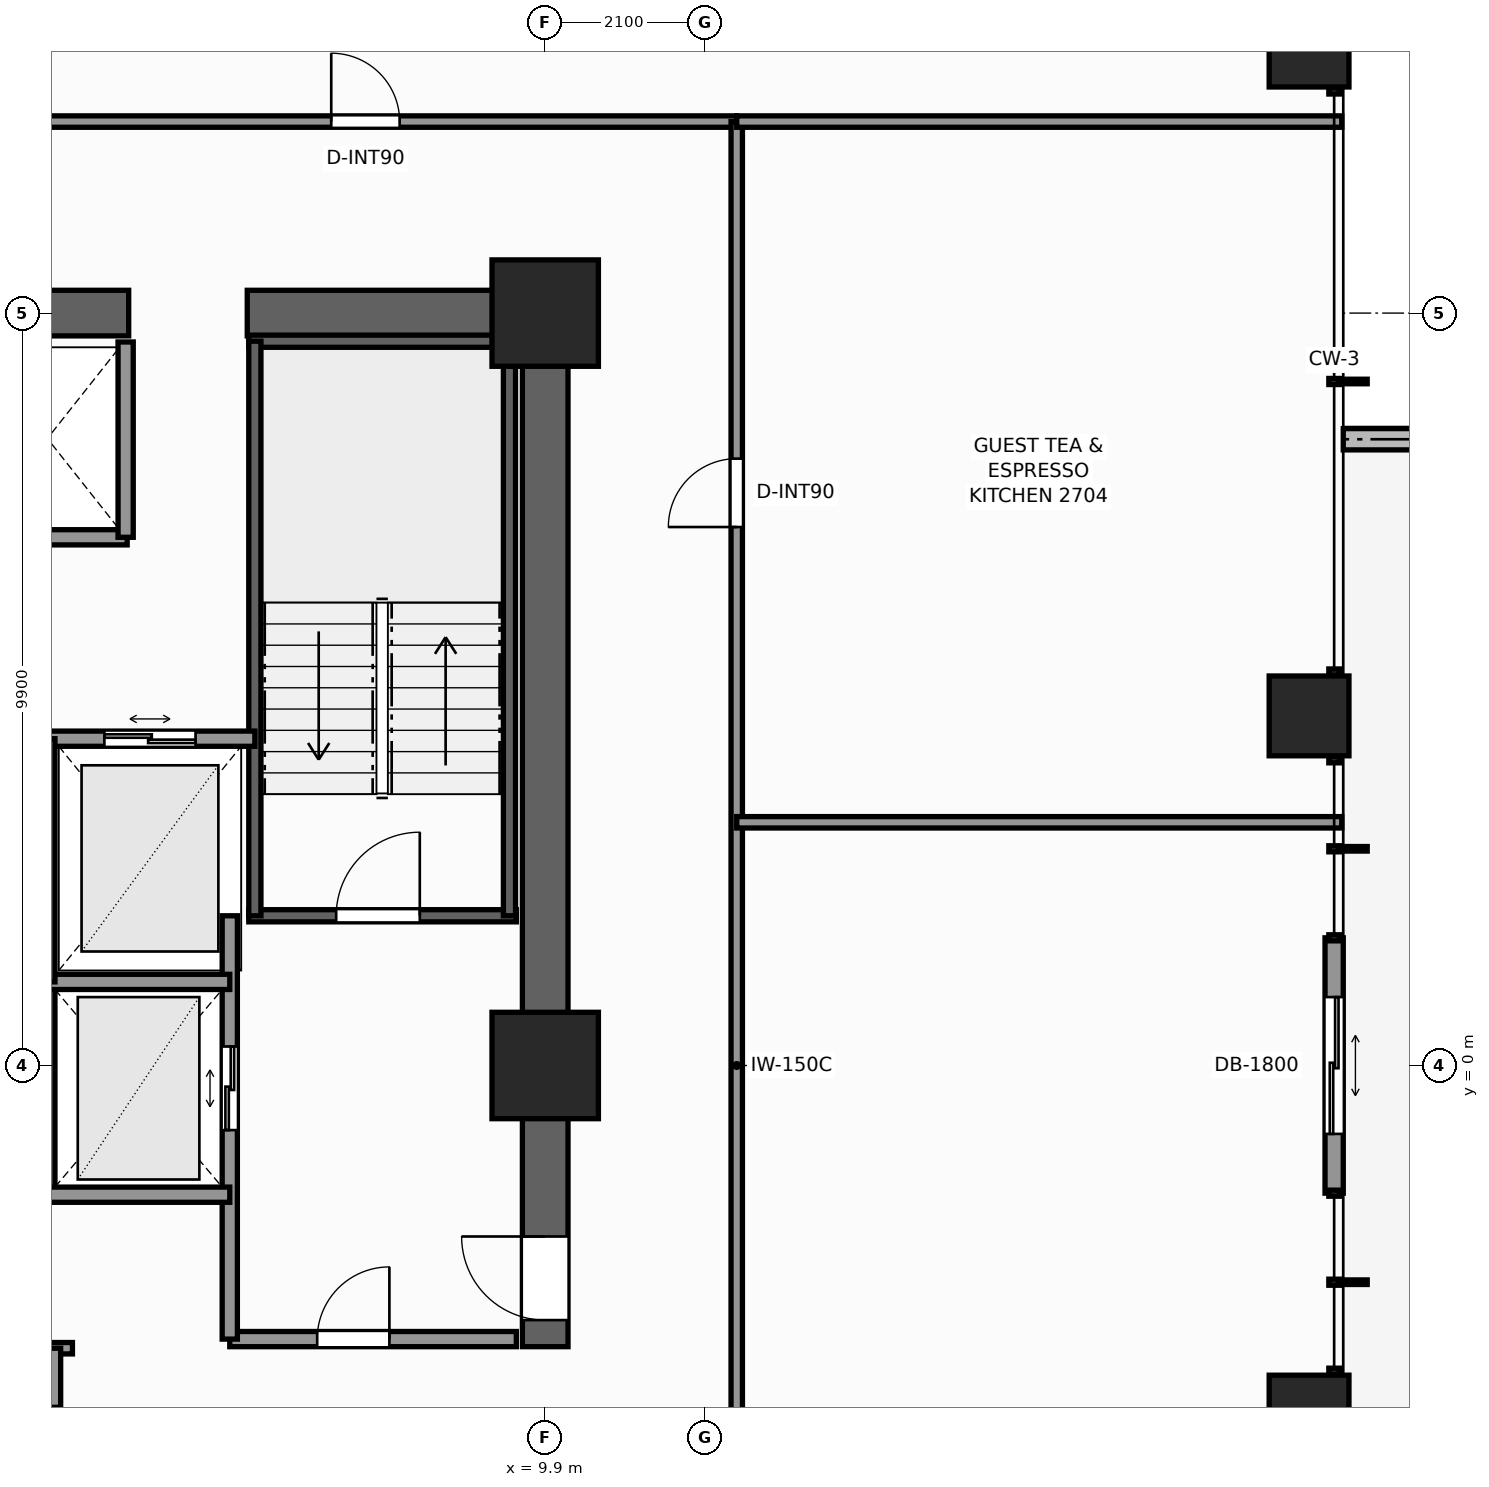
"""IFC4 building model, lengths in metres.
Left out: names, types, materials, properties, quantities, classifications, styles, units other than length and angle.
Written with IfcOpenShell. Run it as: python <this file> out.ifc"""

import sys

from ifc_helpers import new_model, si_unit, direction, frame, frame_2d, origin, origin_2d, place, context, subcontext, project, spatial, rectangle, extrude, element, fill, save


model = new_model("IFC4")
c1 = context("Model", 3, precision=1e-05, world=origin(), true_north=direction((0.0, 1.0)))
c2 = subcontext(c1, "Body", "Model", "MODEL_VIEW")
j1 = project(units=[si_unit("LENGTHUNIT", "METRE"), si_unit("PLANEANGLEUNIT", "RADIAN")], contexts=[c1])
p1 = place(None, origin())
s1 = spatial("IfcSite", under=j1, at=p1, CompositionType="ELEMENT")
p2 = place(p1, origin())
s2 = spatial("IfcBuilding", under=s1, at=p2, CompositionType="ELEMENT")
p3 = place(p2, frame((0.0, 0.0, 95.3)))
s3 = spatial("IfcBuildingStorey", under=s2, at=p3, CompositionType="ELEMENT", Elevation=95.3)
p4 = place(p3, frame((-10.2, 9.9, 0.0), z_axis=(0.0, 0.0, 1.0), x_axis=(1.0, 0.0, 0.0)))
e1 = element("IfcWall", 1, at=p4, inside=s3, PredefinedType="SHEAR", context=c2, shape_type="SweptSolid", body=[
    extrude(rectangle(XDim=14.62, YDim=0.6, at=frame_2d((7.31, 0.0))), origin(), (0.0, 0.0, 1.0), 3.3),
])
p5 = place(p3, frame((5.98, 9.9, 0.0), z_axis=(0.0, 0.0, 1.0), x_axis=(1.0, 0.0, 0.0)))
e2 = element("IfcWall", 2, at=p5, inside=s3, PredefinedType="SHEAR", context=c2, shape_type="SweptSolid", body=[
    extrude(rectangle(XDim=4.22, YDim=0.6, at=frame_2d((2.11, 0.0))), origin(), (0.0, 0.0, 1.0), 3.3),
])
p6 = place(p3, frame((9.9, -3.7, 0.0), z_axis=(0.0, 0.0, 1.0), x_axis=(0.0, 1.0, 0.0)))
e3 = element("IfcWall", 3, at=p6, inside=s3, PredefinedType="SHEAR", context=c2, shape_type="SweptSolid", body=[
    extrude(rectangle(XDim=13.3, YDim=0.6, at=frame_2d((6.65, 0.0))), origin(), (0.0, 0.0, 1.0), 3.3),
])
p7 = place(p6, frame((0.35, 0.0, 0.0)))
e4 = element("IfcOpeningElement", 4, at=p7, cuts=e3, PredefinedType="OPENING", context=c2, shape_type="SweptSolid", body=[
    extrude(rectangle(XDim=1.1, YDim=2.2, at=frame_2d((0.55, 1.1))), frame((0.0, 0.31, 0.0), z_axis=(0.0, -1.0, 0.0), x_axis=(1.0, 0.0, 0.0)), (0.0, 0.0, 1.0), 0.62),
])
for number, where, z_axis, x_axis in (
    (5, (9.9, 9.9, 0.0), (0.0, 0.0, 1.0), (1.0, 0.0, 0.0)),
    (6, (9.9, 0.0, 0.0), (0.0, 0.0, 1.0), (1.0, 0.0, 0.0)),
):
    element("IfcColumn", number, at=place(p3, frame(where, z_axis=z_axis, x_axis=x_axis)), inside=s3, PredefinedType="COLUMN", context=c2, shape_type="SweptSolid", body=[
        extrude(rectangle(XDim=1.4, YDim=1.4, at=origin_2d()), origin(), (0.0, 0.0, 1.0), 3.3),
    ])
for number, where, z_axis, x_axis in (
    (7, (19.95, -4.6, 0.0), (0.0, 0.0, 1.0), (1.0, 0.0, 0.0)),
    (8, (19.95, 4.6, 0.0), (0.0, 0.0, 1.0), (1.0, 0.0, 0.0)),
    (9, (19.95, 13.4, 0.0), (0.0, 0.0, 1.0), (1.0, 0.0, 0.0)),
):
    element("IfcColumn", number, at=place(p3, frame(where, z_axis=z_axis, x_axis=x_axis)), inside=s3, PredefinedType="COLUMN", context=c2, shape_type="SweptSolid", body=[
        extrude(rectangle(XDim=1.05, YDim=1.05, at=origin_2d()), origin(), (0.0, 0.0, 1.0), 3.3),
    ])
p8 = place(p3, frame((23.767, 8.24, -0.04), z_axis=(0.0, 0.0, 1.0), x_axis=(-1.0, 0.0, 0.0)))
e10 = element("IfcWall", 10, at=p8, inside=s3, PredefinedType="PARAPET", context=c2, shape_type="SweptSolid", body=[
    extrude(rectangle(XDim=3.367, YDim=0.28, at=frame_2d((1.684, 0.0))), origin(), (0.0, 0.0, 1.0), 0.42),
])
p9 = place(p3, frame((20.28, 1.68, 0.0), z_axis=(0.0, 0.0, 1.0), x_axis=(0.0, -1.0, 0.0)))
e11 = element("IfcWall", 11, at=p9, inside=s3, PredefinedType="STANDARD", context=c2, shape_type="SweptSolid", body=[
    extrude(rectangle(XDim=3.36, YDim=0.24, at=frame_2d((1.68, 0.0))), origin(), (0.0, 0.0, 1.0), 3.08),
])
p10 = place(p9, frame((0.78, 0.0, 0.0)))
e12 = element("IfcOpeningElement", 12, at=p10, cuts=e11, PredefinedType="OPENING", context=c2, shape_type="SweptSolid", body=[
    extrude(rectangle(XDim=1.8, YDim=2.2, at=frame_2d((0.9, 1.1))), frame((0.0, 0.13, 0.0), z_axis=(0.0, -1.0, 0.0), x_axis=(1.0, 0.0, 0.0)), (0.0, 0.0, 1.0), 0.26),
])
p11 = place(p3, frame((6.0, 1.97, 0.0), z_axis=(0.0, 0.0, 1.0), x_axis=(1.0, 0.0, 0.0)))
e13 = element("IfcWall", 13, at=p11, inside=s3, PredefinedType="SHEAR", context=c2, shape_type="SweptSolid", body=[
    extrude(rectangle(XDim=3.52, YDim=0.16, at=frame_2d((1.76, 0.0))), origin(), (0.0, 0.0, 1.0), 3.3),
])
p12 = place(p11, frame((1.15, 0.0, 0.0)))
e14 = element("IfcOpeningElement", 14, at=p12, cuts=e13, PredefinedType="OPENING", context=c2, shape_type="SweptSolid", body=[
    extrude(rectangle(XDim=1.1, YDim=2.2, at=frame_2d((0.55, 1.1))), frame((0.0, 0.09, 0.0), z_axis=(0.0, -1.0, 0.0), x_axis=(1.0, 0.0, 0.0)), (0.0, 0.0, 1.0), 0.18),
])
p13 = place(p3, frame((6.0, 9.53, 0.0), z_axis=(0.0, 0.0, 1.0), x_axis=(1.0, 0.0, 0.0)))
e15 = element("IfcWall", 15, at=p13, inside=s3, PredefinedType="SHEAR", context=c2, shape_type="SweptSolid", body=[
    extrude(rectangle(XDim=3.52, YDim=0.16, at=frame_2d((1.76, 0.0))), origin(), (0.0, 0.0, 1.0), 3.3),
])
for number, where, z_axis, x_axis in (
    (16, (6.08, 1.97, 0.0), (0.0, 0.0, 1.0), (0.0, 1.0, 0.0)),
    (17, (9.43, 1.97, 0.0), (0.0, 0.0, 1.0), (0.0, 1.0, 0.0)),
):
    element("IfcWall", number, at=place(p3, frame(where, z_axis=z_axis, x_axis=x_axis)), inside=s3, PredefinedType="SHEAR", context=c2, shape_type="SweptSolid", body=[
        extrude(rectangle(XDim=7.56, YDim=0.16, at=frame_2d((3.78, 0.0))), origin(), (0.0, 0.0, 1.0), 3.3),
    ])
p14 = place(p3, frame((5.75, -3.6, 0.0), z_axis=(0.0, 0.0, 1.0), x_axis=(1.0, 0.0, 0.0)))
e18 = element("IfcWall", 18, at=p14, inside=s3, PredefinedType="SOLIDWALL", context=c2, shape_type="SweptSolid", body=[
    extrude(rectangle(XDim=3.77, YDim=0.2, at=frame_2d((1.885, 0.0))), origin(), (0.0, 0.0, 1.0), 3.08),
])
p15 = place(p14, frame((1.15, 0.0, 0.0)))
e19 = element("IfcOpeningElement", 19, at=p15, cuts=e18, PredefinedType="OPENING", context=c2, shape_type="SweptSolid", body=[
    extrude(rectangle(XDim=0.95, YDim=2.06, at=frame_2d((0.475, 1.03))), frame((0.0, 0.11, 0.0), z_axis=(0.0, -1.0, 0.0), x_axis=(1.0, 0.0, 0.0)), (0.0, 0.0, 1.0), 0.22),
])
p16 = place(p3, frame((5.75, -3.6, 0.0), z_axis=(0.0, 0.0, 1.0), x_axis=(0.0, 1.0, 0.0)))
e20 = element("IfcWall", 20, at=p16, inside=s3, PredefinedType="SOLIDWALL", context=c2, shape_type="SweptSolid", body=[
    extrude(rectangle(XDim=5.57, YDim=0.2, at=frame_2d((2.785, 0.0))), origin(), (0.0, 0.0, 1.0), 3.08),
])
p17 = place(p16, frame((2.75, 0.0, 0.0)))
e21 = element("IfcOpeningElement", 21, at=p17, cuts=e20, PredefinedType="OPENING", context=c2, shape_type="SweptSolid", body=[
    extrude(rectangle(XDim=1.1, YDim=2.2, at=frame_2d((0.55, 1.1))), frame((0.0, 0.11, 0.0), z_axis=(0.0, -1.0, 0.0), x_axis=(1.0, 0.0, 0.0)), (0.0, 0.0, 1.0), 0.22),
])
p18 = place(p3, frame((3.35, -1.7, 0.0), z_axis=(0.0, 0.0, 1.0), x_axis=(0.0, 1.0, 0.0)))
e22 = element("IfcWall", 22, at=p18, inside=s3, PredefinedType="SOLIDWALL", context=c2, shape_type="SweptSolid", body=[
    extrude(rectangle(XDim=2.8, YDim=0.2, at=frame_2d((1.4, 0.0))), origin(), (0.0, 0.0, 1.0), 3.08),
])
for number, where, z_axis, x_axis in (
    (23, (3.35, -1.7, 0.0), (0.0, 0.0, 1.0), (1.0, 0.0, 0.0)),
    (24, (3.35, 1.1, 0.0), (0.0, 0.0, 1.0), (1.0, 0.0, 0.0)),
):
    element("IfcWall", number, at=place(p3, frame(where, z_axis=z_axis, x_axis=x_axis)), inside=s3, PredefinedType="SOLIDWALL", context=c2, shape_type="SweptSolid", body=[
        extrude(rectangle(XDim=2.4, YDim=0.2, at=frame_2d((1.2, 0.0))), origin(), (0.0, 0.0, 1.0), 3.08),
    ])
p19 = place(p3, frame((3.35, 4.3, 0.0), z_axis=(0.0, 0.0, 1.0), x_axis=(1.0, 0.0, 0.0)))
e25 = element("IfcWall", 25, at=p19, inside=s3, PredefinedType="SOLIDWALL", context=c2, shape_type="SweptSolid", body=[
    extrude(rectangle(XDim=2.73, YDim=0.2, at=frame_2d((1.365, 0.0))), origin(), (0.0, 0.0, 1.0), 3.08),
])
p20 = place(p19, frame((0.75, 0.0, 0.0)))
e26 = element("IfcOpeningElement", 26, at=p20, cuts=e25, PredefinedType="OPENING", context=c2, shape_type="SweptSolid", body=[
    extrude(rectangle(XDim=1.2, YDim=2.25, at=frame_2d((0.6, 1.125))), frame((0.0, 0.11, 0.0), z_axis=(0.0, -1.0, 0.0), x_axis=(1.0, 0.0, 0.0)), (0.0, 0.0, 1.0), 0.22),
])
p21 = place(p3, frame((0.22, 6.95, 0.0), z_axis=(0.0, 0.0, 1.0), x_axis=(1.0, 0.0, 0.0)))
e27 = element("IfcWall", 27, at=p21, inside=s3, PredefinedType="SOLIDWALL", context=c2, shape_type="SweptSolid", body=[
    extrude(rectangle(XDim=4.18, YDim=0.2, at=frame_2d((2.09, 0.0))), origin(), (0.0, 0.0, 1.0), 3.08),
])
p22 = place(p3, frame((4.38, 6.95, 0.0), z_axis=(0.0, 0.0, 1.0), x_axis=(0.0, 1.0, 0.0)))
e28 = element("IfcWall", 28, at=p22, inside=s3, PredefinedType="SOLIDWALL", context=c2, shape_type="SweptSolid", body=[
    extrude(rectangle(XDim=2.57, YDim=0.2, at=frame_2d((1.285, 0.0))), origin(), (0.0, 0.0, 1.0), 3.08),
])
p23 = place(p3, frame((3.35, 1.1, 0.0), z_axis=(0.0, 0.0, 1.0), x_axis=(0.0, 1.0, 0.0)))
e29 = element("IfcWall", 29, at=p23, inside=s3, PredefinedType="SOLIDWALL", context=c2, shape_type="SweptSolid", body=[
    extrude(rectangle(XDim=3.2, YDim=0.2, at=frame_2d((1.6, 0.0))), origin(), (0.0, 0.0, 1.0), 3.08),
])
p24 = place(p3, frame((-3.68, -3.72, 0.0), z_axis=(0.0, 0.0, 1.0), x_axis=(1.0, 0.0, 0.0)))
e30 = element("IfcWall", 30, at=p24, inside=s3, PredefinedType="PARTITIONING", context=c2, shape_type="SweptSolid", body=[
    extrude(rectangle(XDim=7.36, YDim=0.15, at=frame_2d((3.68, 0.0))), origin(), (0.0, 0.0, 1.0), 3.08),
])
p25 = place(p3, frame((3.45, -6.08, 0.0), z_axis=(0.0, 0.0, 1.0), x_axis=(0.0, 1.0, 0.0)))
e31 = element("IfcWall", 31, at=p25, inside=s3, PredefinedType="PARTITIONING", context=c2, shape_type="SweptSolid", body=[
    extrude(rectangle(XDim=2.36, YDim=0.15, at=frame_2d((1.18, 0.0))), origin(), (0.0, 0.0, 1.0), 3.08),
])
p26 = place(p25, frame((0.65, 0.0, 0.0)))
e32 = element("IfcOpeningElement", 32, at=p26, cuts=e31, PredefinedType="OPENING", context=c2, shape_type="SweptSolid", body=[
    extrude(rectangle(XDim=0.95, YDim=2.06, at=frame_2d((0.475, 1.03))), frame((0.0, 0.085, 0.0), z_axis=(0.0, -1.0, 0.0), x_axis=(1.0, 0.0, 0.0)), (0.0, 0.0, 1.0), 0.17),
])
p27 = place(p3, frame((-12.26, 12.42, 0.0), z_axis=(0.0, 0.0, 1.0), x_axis=(1.0, 0.0, 0.0)))
e33 = element("IfcWall", 33, at=p27, inside=s3, PredefinedType="PARTITIONING", context=c2, shape_type="SweptSolid", body=[
    extrude(rectangle(XDim=24.68, YDim=0.15, at=frame_2d((12.34, 0.0))), origin(), (0.0, 0.0, 1.0), 2.292),
])
p28 = place(p27, frame((4.275, 0.0, 0.0)))
e34 = element("IfcOpeningElement", 34, at=p28, cuts=e33, PredefinedType="OPENING", context=c2, shape_type="SweptSolid", body=[
    extrude(rectangle(XDim=0.9, YDim=2.06, at=frame_2d((0.45, 1.03))), frame((0.0, 0.085, 0.0), z_axis=(0.0, -1.0, 0.0), x_axis=(1.0, 0.0, 0.0)), (0.0, 0.0, 1.0), 0.17),
])
p29 = place(p27, frame((19.345, 0.0, 0.0)))
e35 = element("IfcOpeningElement", 35, at=p29, cuts=e33, PredefinedType="OPENING", context=c2, shape_type="SweptSolid", body=[
    extrude(rectangle(XDim=0.9, YDim=2.06, at=frame_2d((0.45, 1.03))), frame((0.0, 0.085, 0.0), z_axis=(0.0, -1.0, 0.0), x_axis=(1.0, 0.0, 0.0)), (0.0, 0.0, 1.0), 0.17),
])
p30 = place(p3, frame((12.42, -12.42, 0.0), z_axis=(0.0, 0.0, 1.0), x_axis=(0.0, 1.0, 0.0)))
e36 = element("IfcWall", 36, at=p30, inside=s3, PredefinedType="PARTITIONING", context=c2, shape_type="SweptSolid", body=[
    extrude(rectangle(XDim=24.84, YDim=0.15, at=frame_2d((12.42, 0.0))), origin(), (0.0, 0.0, 1.0), 2.292),
])
p31 = place(p30, frame((4.435, 0.0, 0.0)))
e37 = element("IfcOpeningElement", 37, at=p31, cuts=e36, PredefinedType="OPENING", context=c2, shape_type="SweptSolid", body=[
    extrude(rectangle(XDim=0.9, YDim=2.06, at=frame_2d((0.45, 1.03))), frame((0.0, 0.085, 0.0), z_axis=(0.0, -1.0, 0.0), x_axis=(1.0, 0.0, 0.0)), (0.0, 0.0, 1.0), 0.17),
])
p32 = place(p30, frame((19.505, 0.0, 0.0)))
e38 = element("IfcOpeningElement", 38, at=p32, cuts=e36, PredefinedType="OPENING", context=c2, shape_type="SweptSolid", body=[
    extrude(rectangle(XDim=0.9, YDim=2.06, at=frame_2d((0.45, 1.03))), frame((0.0, 0.085, 0.0), z_axis=(0.0, -1.0, 0.0), x_axis=(1.0, 0.0, 0.0)), (0.0, 0.0, 1.0), 0.17),
])
p33 = place(p3, frame((12.42, 12.42, 0.0), z_axis=(0.0, 0.0, 1.0), x_axis=(1.0, 0.0, 0.0)))
e39 = element("IfcWall", 39, at=p33, inside=s3, PredefinedType="PARTITIONING", context=c2, shape_type="SweptSolid", body=[
    extrude(rectangle(XDim=7.96, YDim=0.15, at=frame_2d((3.98, 0.0))), origin(), (0.0, 0.0, 1.0), 2.292),
])
p34 = place(p3, frame((12.42, 3.2, 0.0), z_axis=(0.0, 0.0, 1.0), x_axis=(1.0, 0.0, 0.0)))
e40 = element("IfcWall", 40, at=p34, inside=s3, PredefinedType="PARTITIONING", context=c2, shape_type="SweptSolid", body=[
    extrude(rectangle(XDim=7.96, YDim=0.15, at=frame_2d((3.98, 0.0))), origin(), (0.0, 0.0, 1.0), 2.449),
])
p35 = place(p10, origin())
e41 = element("IfcDoor", 41, at=p35, inside=s3, OperationType="DOUBLE_DOOR_SLIDING", PredefinedType="DOOR", context=c2, shape_type="SweptSolid", body=[
    extrude(rectangle(XDim=1.8, YDim=2.2, at=frame_2d((0.9, 1.1))), frame((0.0, 0.025, 0.0), z_axis=(0.0, -1.0, 0.0), x_axis=(1.0, 0.0, 0.0)), (0.0, 0.0, 1.0), 0.05),
])
fill(e12, e41)
p36 = place(p12, origin())
e42 = element("IfcDoor", 42, at=p36, inside=s3, OperationType="SINGLE_SWING_RIGHT", PredefinedType="DOOR", context=c2, shape_type="SweptSolid", body=[
    extrude(rectangle(XDim=1.1, YDim=2.2, at=frame_2d((0.55, 1.1))), frame((0.0, 0.025, 0.0), z_axis=(0.0, -1.0, 0.0), x_axis=(1.0, 0.0, 0.0)), (0.0, 0.0, 1.0), 0.05),
])
fill(e14, e42)
p37 = place(p7, origin())
e43 = element("IfcDoor", 43, at=p37, inside=s3, OperationType="SINGLE_SWING_RIGHT", PredefinedType="DOOR", context=c2, shape_type="SweptSolid", body=[
    extrude(rectangle(XDim=1.1, YDim=2.2, at=frame_2d((0.55, 1.1))), frame((0.0, 0.025, 0.0), z_axis=(0.0, -1.0, 0.0), x_axis=(1.0, 0.0, 0.0)), (0.0, 0.0, 1.0), 0.05),
])
fill(e4, e43)
p38 = place(p17, origin())
e44 = element("IfcDoor", 44, at=p38, inside=s3, OperationType="DOUBLE_DOOR_SLIDING", PredefinedType="DOOR", context=c2, shape_type="SweptSolid", body=[
    extrude(rectangle(XDim=1.1, YDim=2.2, at=frame_2d((0.55, 1.1))), frame((0.0, 0.025, 0.0), z_axis=(0.0, -1.0, 0.0), x_axis=(1.0, 0.0, 0.0)), (0.0, 0.0, 1.0), 0.05),
])
fill(e21, e44)
p39 = place(p20, origin())
e45 = element("IfcDoor", 45, at=p39, inside=s3, OperationType="DOUBLE_DOOR_SLIDING", PredefinedType="DOOR", context=c2, shape_type="SweptSolid", body=[
    extrude(rectangle(XDim=1.2, YDim=2.25, at=frame_2d((0.6, 1.125))), frame((0.0, 0.025, 0.0), z_axis=(0.0, -1.0, 0.0), x_axis=(1.0, 0.0, 0.0)), (0.0, 0.0, 1.0), 0.05),
])
fill(e26, e45)
p40 = place(p15, origin())
e46 = element("IfcDoor", 46, at=p40, inside=s3, OperationType="SINGLE_SWING_RIGHT", PredefinedType="DOOR", context=c2, shape_type="SweptSolid", body=[
    extrude(rectangle(XDim=0.95, YDim=2.06, at=frame_2d((0.475, 1.03))), frame((0.0, 0.025, 0.0), z_axis=(0.0, -1.0, 0.0), x_axis=(1.0, 0.0, 0.0)), (0.0, 0.0, 1.0), 0.05),
])
fill(e19, e46)
p41 = place(p26, origin())
e47 = element("IfcDoor", 47, at=p41, inside=s3, OperationType="SINGLE_SWING_LEFT", PredefinedType="DOOR", context=c2, shape_type="SweptSolid", body=[
    extrude(rectangle(XDim=0.95, YDim=2.06, at=frame_2d((0.475, 1.03))), frame((0.0, 0.025, 0.0), z_axis=(0.0, -1.0, 0.0), x_axis=(1.0, 0.0, 0.0)), (0.0, 0.0, 1.0), 0.05),
])
fill(e32, e47)
p42 = place(p29, origin())
e48 = element("IfcDoor", 48, at=p42, inside=s3, OperationType="SINGLE_SWING_LEFT", PredefinedType="DOOR", context=c2, shape_type="SweptSolid", body=[
    extrude(rectangle(XDim=0.9, YDim=2.06, at=frame_2d((0.45, 1.03))), frame((0.0, 0.025, 0.0), z_axis=(0.0, -1.0, 0.0), x_axis=(1.0, 0.0, 0.0)), (0.0, 0.0, 1.0), 0.05),
])
fill(e35, e48)
p43 = place(p32, origin())
e49 = element("IfcDoor", 49, at=p43, inside=s3, OperationType="SINGLE_SWING_LEFT", PredefinedType="DOOR", context=c2, shape_type="SweptSolid", body=[
    extrude(rectangle(XDim=0.9, YDim=2.06, at=frame_2d((0.45, 1.03))), frame((0.0, 0.025, 0.0), z_axis=(0.0, -1.0, 0.0), x_axis=(1.0, 0.0, 0.0)), (0.0, 0.0, 1.0), 0.05),
])
fill(e38, e49)
save(model, sys.argv[1])
